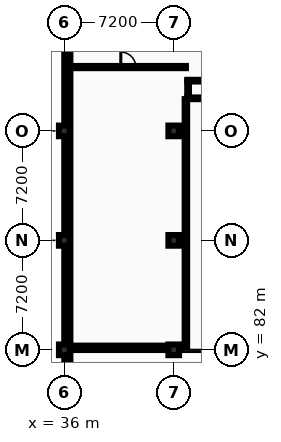
"""IFC4 building model, lengths in metres.
Left out: names, types, materials, properties, quantities, classifications, styles, units other than length and angle.
Written with IfcOpenShell. Run it as: python <this file> out.ifc"""

import sys

from ifc_helpers import new_model, si_unit, direction, frame, frame_2d, origin, origin_2d, place, context, subcontext, project, spatial, rectangle, extrude, element, fill, save


model = new_model("IFC4")
c1 = context("Model", 3, precision=1e-05, world=origin(), true_north=direction((0.0, 1.0)))
c2 = subcontext(c1, "Body", "Model", "MODEL_VIEW")
j1 = project(units=[si_unit("LENGTHUNIT", "METRE"), si_unit("PLANEANGLEUNIT", "RADIAN")], contexts=[c1])
p1 = place(None, origin())
s1 = spatial("IfcSite", under=j1, at=p1, CompositionType="ELEMENT")
p2 = place(p1, origin())
s2 = spatial("IfcBuilding", under=s1, at=p2, CompositionType="ELEMENT")
p3 = place(p2, frame((0.0, 0.0, -4.8)))
s3 = spatial("IfcBuildingStorey", under=s2, at=p3, CompositionType="ELEMENT", Elevation=-4.8)
for number, where, z_axis, x_axis in (
    (1, (36.0, 82.0, 0.0), (0.0, 0.0, 1.0), (1.0, 0.0, 0.0)),
    (2, (36.0, 89.2, 0.0), (0.0, 0.0, 1.0), (1.0, 0.0, 0.0)),
    (3, (36.0, 96.4, 0.0), (0.0, 0.0, 1.0), (1.0, 0.0, 0.0)),
    (4, (43.2, 82.0, 0.0), (0.0, 0.0, 1.0), (1.0, 0.0, 0.0)),
    (5, (43.2, 89.2, 0.0), (0.0, 0.0, 1.0), (1.0, 0.0, 0.0)),
    (6, (43.2, 96.4, 0.0), (0.0, 0.0, 1.0), (1.0, 0.0, 0.0)),
):
    element("IfcColumn", number, at=place(p3, frame(where, z_axis=z_axis, x_axis=x_axis)), inside=s3, PredefinedType="COLUMN", context=c2, shape_type="SweptSolid", body=[
        extrude(rectangle(XDim=0.7, YDim=0.7, at=origin_2d()), origin(), (0.0, 0.0, 1.0), 4.8),
    ])
p4 = place(p3, frame((36.2, 117.6, 0.0), z_axis=(0.0, 0.0, 1.0), x_axis=(0.0, -1.0, 0.0)))
e7 = element("IfcWall", 7, at=p4, inside=s3, PredefinedType="USERDEFINED", context=c2, shape_type="SweptSolid", body=[
    extrude(rectangle(XDim=38.4, YDim=0.4, at=frame_2d((19.2, 0.0))), origin(), (0.0, 0.0, 1.0), 4.545),
])
for number, where, z_axis, x_axis in (
    (8, (44.09, 98.545, 0.0), (0.0, 0.0, 1.0), (1.0, 0.0, 0.0)),
    (9, (44.09, 99.705, 0.0), (0.0, 0.0, 1.0), (1.0, 0.0, 0.0)),
):
    element("IfcWall", number, at=place(p3, frame(where, z_axis=z_axis, x_axis=x_axis)), inside=s3, PredefinedType="PARTITIONING", context=c2, shape_type="SweptSolid", body=[
        extrude(rectangle(XDim=1.27, YDim=0.11, at=frame_2d((0.635, 0.0))), origin(), (0.0, 0.0, 1.0), 4.54),
    ])
p5 = place(p3, frame((44.145, 98.6, 0.0), z_axis=(0.0, 0.0, 1.0), x_axis=(0.0, 1.0, 0.0)))
e10 = element("IfcWall", 10, at=p5, inside=s3, PredefinedType="PARTITIONING", context=c2, shape_type="SweptSolid", body=[
    extrude(rectangle(XDim=1.05, YDim=0.11, at=frame_2d((0.525, 0.0))), origin(), (0.0, 0.0, 1.0), 4.54),
])
p6 = place(p3, frame((36.42, 82.2, 0.0), z_axis=(0.0, 0.0, 1.0), x_axis=(1.0, 0.0, 0.0)))
e11 = element("IfcWall", 11, at=p6, inside=s3, PredefinedType="PARTITIONING", context=c2, shape_type="SweptSolid", body=[
    extrude(rectangle(XDim=6.4, YDim=0.15, at=frame_2d((3.2, 0.0))), origin(), (0.0, 0.0, 1.0), 4.095),
])
p7 = place(p3, frame((36.42, 100.6, 0.0), z_axis=(0.0, 0.0, 1.0), x_axis=(1.0, 0.0, 0.0)))
e12 = element("IfcWall", 12, at=p7, inside=s3, PredefinedType="PARTITIONING", context=c2, shape_type="SweptSolid", body=[
    extrude(rectangle(XDim=7.58, YDim=0.142, at=frame_2d((3.79, 0.0))), origin(), (0.0, 0.0, 1.0), 4.545),
])
p8 = place(p7, frame((3.298, 0.0, 0.0)))
e13 = element("IfcOpeningElement", 13, at=p8, cuts=e12, PredefinedType="OPENING", context=c2, shape_type="SweptSolid", body=[
    extrude(rectangle(XDim=0.984, YDim=2.068, at=frame_2d((0.492, 1.034))), frame((0.0, 0.081, 0.0), z_axis=(0.0, -1.0, 0.0), x_axis=(1.0, 0.0, 0.0)), (0.0, 0.0, 1.0), 0.162),
])
p9 = place(p3, frame((44.0, 82.2, 0.0), z_axis=(0.0, 0.0, 1.0), x_axis=(0.0, 1.0, 0.0)))
e14 = element("IfcWall", 14, at=p9, inside=s3, PredefinedType="PARTITIONING", context=c2, shape_type="SweptSolid", body=[
    extrude(rectangle(XDim=16.29, YDim=0.16, at=frame_2d((8.145, 0.0))), origin(), (0.0, 0.0, 1.0), 4.545),
])
p10 = place(p8, origin())
e15 = element("IfcDoor", 15, at=p10, inside=s3, OperationType="SINGLE_SWING_LEFT", PredefinedType="DOOR", context=c2, shape_type="SweptSolid", body=[
    extrude(rectangle(XDim=0.984, YDim=2.068, at=frame_2d((0.492, 1.034))), frame((0.0, 0.025, 0.0), z_axis=(0.0, -1.0, 0.0), x_axis=(1.0, 0.0, 0.0)), (0.0, 0.0, 1.0), 0.05),
])
fill(e13, e15)
save(model, sys.argv[1])
